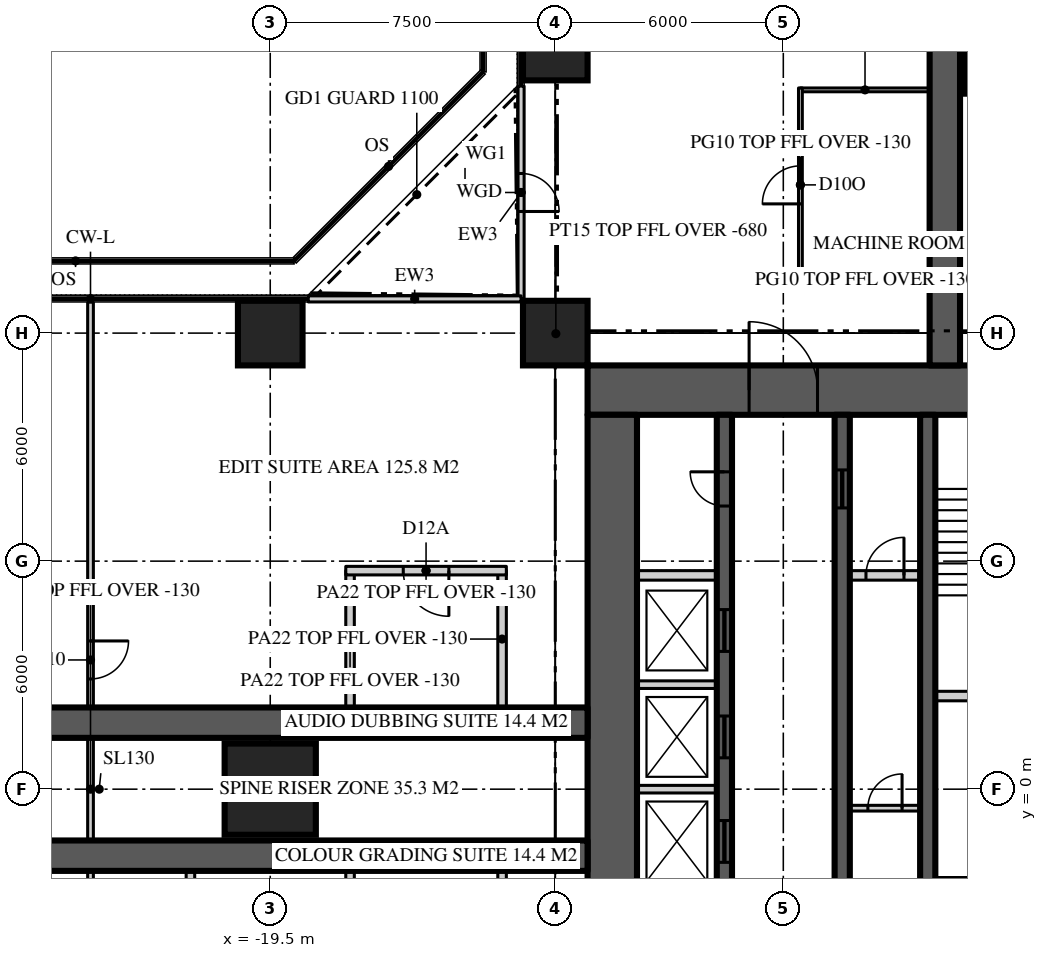
"""IFC4 building model, lengths in metres.
Left out: names, types, materials, properties, quantities, classifications, styles, units other than length and angle.
Written with IfcOpenShell. Run it as: python <this file> out.ifc"""

import sys

from ifc_helpers import new_model, si_unit, direction, frame, frame_2d, origin, origin_2d, place, context, subcontext, project, spatial, rectangle, extrude, element, fill, save


model = new_model("IFC4")
c1 = context("Model", 3, precision=1e-05, world=origin(), true_north=direction((0.0, 1.0)))
c2 = subcontext(c1, "Body", "Model", "MODEL_VIEW")
j1 = project(units=[si_unit("LENGTHUNIT", "METRE"), si_unit("PLANEANGLEUNIT", "RADIAN")], contexts=[c1])
p1 = place(None, origin())
s1 = spatial("IfcSite", under=j1, at=p1, CompositionType="ELEMENT")
p2 = place(p1, origin())
s2 = spatial("IfcBuilding", under=s1, at=p2, CompositionType="ELEMENT")
p3 = place(p2, frame((0.0, 0.0, 59.1)))
s3 = spatial("IfcBuildingStorey", under=s2, at=p3, CompositionType="ELEMENT", Elevation=59.1)
p4 = place(p3, frame((-11.15, 10.5, 0.0), z_axis=(0.0, 0.0, 1.0), x_axis=(1.0, 0.0, 0.0)))
e1 = element("IfcWall", 1, at=p4, inside=s3, PredefinedType="SHEAR", context=c2, shape_type="SweptSolid", body=[
    extrude(rectangle(XDim=22.3, YDim=1.3, at=frame_2d((11.15, 0.0))), origin(), (0.0, 0.0, 1.0), 3.9),
])
p5 = place(p4, frame((4.25, 0.0, 0.0)))
e2 = element("IfcOpeningElement", 2, at=p5, cuts=e1, PredefinedType="OPENING", context=c2, shape_type="SweptSolid", body=[
    extrude(rectangle(XDim=1.8, YDim=2.2, at=frame_2d((0.9, 1.1))), frame((0.0, 0.66, 0.0), z_axis=(0.0, -1.0, 0.0), x_axis=(1.0, 0.0, 0.0)), (0.0, 0.0, 1.0), 1.32),
])
p6 = place(p4, frame((16.25, 0.0, 0.0)))
e3 = element("IfcOpeningElement", 3, at=p6, cuts=e1, PredefinedType="OPENING", context=c2, shape_type="SweptSolid", body=[
    extrude(rectangle(XDim=1.8, YDim=2.2, at=frame_2d((0.9, 1.1))), frame((0.0, 0.66, 0.0), z_axis=(0.0, -1.0, 0.0), x_axis=(1.0, 0.0, 0.0)), (0.0, 0.0, 1.0), 1.32),
])
p7 = place(p3, frame((-10.5, 9.85, 0.0), z_axis=(0.0, 0.0, 1.0), x_axis=(0.0, -1.0, 0.0)))
e4 = element("IfcWall", 4, at=p7, inside=s3, PredefinedType="SHEAR", context=c2, shape_type="SweptSolid", body=[
    extrude(rectangle(XDim=19.7, YDim=1.3, at=frame_2d((9.85, 0.0))), origin(), (0.0, 0.0, 1.0), 3.9),
])
p8 = place(p7, frame((17.25, 0.0, 0.0)))
e5 = element("IfcOpeningElement", 5, at=p8, cuts=e4, PredefinedType="OPENING", context=c2, shape_type="SweptSolid", body=[
    extrude(rectangle(XDim=1.0, YDim=2.2, at=frame_2d((0.5, 1.1))), frame((0.0, 0.66, 0.0), z_axis=(0.0, -1.0, 0.0), x_axis=(1.0, 0.0, 0.0)), (0.0, 0.0, 1.0), 1.32),
])
for number, where, z_axis, x_axis in (
    (6, (-1.75, 11.15, 0.0), (0.0, 0.0, 1.0), (0.0, 1.0, 0.0)),
    (7, (-11.15, 1.75, 0.0), (0.0, 0.0, 1.0), (-1.0, 0.0, 0.0)),
    (8, (-11.15, -1.75, 0.0), (0.0, 0.0, 1.0), (-1.0, 0.0, 0.0)),
):
    element("IfcWall", number, at=place(p3, frame(where, z_axis=z_axis, x_axis=x_axis)), inside=s3, PredefinedType="SHEAR", context=c2, shape_type="SweptSolid", body=[
        extrude(rectangle(XDim=15.25, YDim=0.8, at=frame_2d((7.625, 0.0))), origin(), (0.0, 0.0, 1.0), 3.9),
    ])
p9 = place(p3, frame((-19.5, 0.0, 0.0), z_axis=(0.0, 0.0, 1.0), x_axis=(1.0, 0.0, 0.0)))
e9 = element("IfcColumn", 9, at=p9, inside=s3, PredefinedType="COLUMN", context=c2, shape_type="SweptSolid", body=[
    extrude(rectangle(XDim=2.4, YDim=2.4, at=origin_2d()), origin(), (0.0, 0.0, 1.0), 3.9),
])
for number, where, z_axis, x_axis in (
    (10, (-19.5, 12.0, 0.0), (0.0, 0.0, 1.0), (1.0, 0.0, 0.0)),
    (11, (-12.0, 12.0, 0.0), (0.0, 0.0, 1.0), (1.0, 0.0, 0.0)),
    (12, (-12.0, 19.5, 0.0), (0.0, 0.0, 1.0), (1.0, 0.0, 0.0)),
):
    element("IfcColumn", number, at=place(p3, frame(where, z_axis=z_axis, x_axis=x_axis)), inside=s3, PredefinedType="COLUMN", context=c2, shape_type="SweptSolid", body=[
        extrude(rectangle(XDim=1.7, YDim=1.7, at=origin_2d()), origin(), (0.0, 0.0, 1.0), 3.9),
    ])
p10 = place(p3, frame((0.0, 19.5, 0.0), z_axis=(0.0, 0.0, 1.0), x_axis=(1.0, 0.0, 0.0)))
e13 = element("IfcColumn", 13, at=p10, inside=s3, PredefinedType="COLUMN", context=c2, shape_type="SweptSolid", body=[
    extrude(rectangle(XDim=2.4, YDim=2.4, at=origin_2d()), origin(), (0.0, 0.0, 1.0), 3.9),
])
p11 = place(p3, frame((-12.9, 18.5, 0.0), z_axis=(0.0, 0.0, 1.0), x_axis=(0.0, -1.0, 0.0)))
e14 = element("IfcWall", 14, at=p11, inside=s3, PredefinedType="SOLIDWALL", context=c2, shape_type="SweptSolid", body=[
    extrude(rectangle(XDim=5.6, YDim=0.16, at=frame_2d((2.8, 0.0))), origin(), (0.0, 0.0, 1.0), 3.77),
])
p12 = place(p11, frame((2.3, 0.0, 0.0)))
e15 = element("IfcOpeningElement", 15, at=p12, cuts=e14, PredefinedType="OPENING", context=c2, shape_type="SweptSolid", body=[
    extrude(rectangle(XDim=1.0, YDim=2.2, at=frame_2d((0.5, 1.1))), frame((0.0, 0.09, 0.0), z_axis=(0.0, -1.0, 0.0), x_axis=(1.0, 0.0, 0.0)), (0.0, 0.0, 1.0), 0.18),
])
p13 = place(p3, frame((-12.9, 12.9, 0.0), z_axis=(0.0, 0.0, 1.0), x_axis=(-1.0, 0.0, 0.0)))
e16 = element("IfcWall", 16, at=p13, inside=s3, PredefinedType="SOLIDWALL", context=c2, shape_type="SweptSolid", body=[
    extrude(rectangle(XDim=5.6, YDim=0.16, at=frame_2d((2.8, 0.0))), origin(), (0.0, 0.0, 1.0), 3.77),
])
p14 = place(p3, frame((-7.55, -9.85, 0.0), z_axis=(0.0, 0.0, 1.0), x_axis=(0.0, 1.0, 0.0)))
e17 = element("IfcWall", 17, at=p14, inside=s3, PredefinedType="SHEAR", context=c2, shape_type="SweptSolid", body=[
    extrude(rectangle(XDim=19.7, YDim=0.4, at=frame_2d((9.85, 0.0))), origin(), (0.0, 0.0, 1.0), 3.9),
])
p15 = place(p14, frame((1.45, 0.0, 0.0)))
e18 = element("IfcOpeningElement", 18, at=p15, cuts=e17, PredefinedType="OPENING", context=c2, shape_type="SweptSolid", body=[
    extrude(rectangle(XDim=1.0, YDim=2.2, at=frame_2d((0.5, 1.1))), frame((0.0, 0.21, 0.0), z_axis=(0.0, -1.0, 0.0), x_axis=(1.0, 0.0, 0.0)), (0.0, 0.0, 1.0), 0.42),
])
p16 = place(p14, frame((17.3, 0.0, 0.0)))
e19 = element("IfcOpeningElement", 19, at=p16, cuts=e17, PredefinedType="OPENING", context=c2, shape_type="SweptSolid", body=[
    extrude(rectangle(XDim=0.9, YDim=2.1, at=frame_2d((0.45, 1.05))), frame((0.0, 0.21, 0.0), z_axis=(0.0, -1.0, 0.0), x_axis=(1.0, 0.0, 0.0)), (0.0, 0.0, 1.0), 0.42),
])
p17 = place(p14, frame((5.125, 0.0, 0.0)))
e20 = element("IfcOpeningElement", 20, at=p17, cuts=e17, PredefinedType="OPENING", context=c2, shape_type="SweptSolid", body=[
    extrude(rectangle(XDim=1.1, YDim=2.2, at=frame_2d((0.55, 1.1))), frame((0.0, 0.21, 0.0), z_axis=(0.0, -1.0, 0.0), x_axis=(1.0, 0.0, 0.0)), (0.0, 0.0, 1.0), 0.42),
])
p18 = place(p14, frame((7.925, 0.0, 0.0)))
e21 = element("IfcOpeningElement", 21, at=p18, cuts=e17, PredefinedType="OPENING", context=c2, shape_type="SweptSolid", body=[
    extrude(rectangle(XDim=1.1, YDim=2.2, at=frame_2d((0.55, 1.1))), frame((0.0, 0.21, 0.0), z_axis=(0.0, -1.0, 0.0), x_axis=(1.0, 0.0, 0.0)), (0.0, 0.0, 1.0), 0.42),
])
p19 = place(p14, frame((10.675, 0.0, 0.0)))
e22 = element("IfcOpeningElement", 22, at=p19, cuts=e17, PredefinedType="OPENING", context=c2, shape_type="SweptSolid", body=[
    extrude(rectangle(XDim=1.1, YDim=2.2, at=frame_2d((0.55, 1.1))), frame((0.0, 0.21, 0.0), z_axis=(0.0, -1.0, 0.0), x_axis=(1.0, 0.0, 0.0)), (0.0, 0.0, 1.0), 0.42),
])
p20 = place(p14, frame((13.475, 0.0, 0.0)))
e23 = element("IfcOpeningElement", 23, at=p20, cuts=e17, PredefinedType="OPENING", context=c2, shape_type="SweptSolid", body=[
    extrude(rectangle(XDim=1.1, YDim=2.2, at=frame_2d((0.55, 1.1))), frame((0.0, 0.21, 0.0), z_axis=(0.0, -1.0, 0.0), x_axis=(1.0, 0.0, 0.0)), (0.0, 0.0, 1.0), 0.42),
])
p21 = place(p3, frame((-4.45, -9.85, 0.0), z_axis=(0.0, 0.0, 1.0), x_axis=(0.0, 1.0, 0.0)))
e24 = element("IfcWall", 24, at=p21, inside=s3, PredefinedType="SHEAR", context=c2, shape_type="SweptSolid", body=[
    extrude(rectangle(XDim=19.7, YDim=0.4, at=frame_2d((9.85, 0.0))), origin(), (0.0, 0.0, 1.0), 3.9),
])
p22 = place(p21, frame((1.95, 0.0, 0.0)))
e25 = element("IfcOpeningElement", 25, at=p22, cuts=e24, PredefinedType="OPENING", context=c2, shape_type="SweptSolid", body=[
    extrude(rectangle(XDim=1.0, YDim=2.2, at=frame_2d((0.5, 1.1))), frame((0.0, 0.21, 0.0), z_axis=(0.0, -1.0, 0.0), x_axis=(1.0, 0.0, 0.0)), (0.0, 0.0, 1.0), 0.42),
])
p23 = place(p21, frame((17.25, 0.0, 0.0)))
e26 = element("IfcOpeningElement", 26, at=p23, cuts=e24, PredefinedType="OPENING", context=c2, shape_type="SweptSolid", body=[
    extrude(rectangle(XDim=1.0, YDim=2.1, at=frame_2d((0.5, 1.05))), frame((0.0, 0.21, 0.0), z_axis=(0.0, -1.0, 0.0), x_axis=(1.0, 0.0, 0.0)), (0.0, 0.0, 1.0), 0.42),
])
p24 = place(p3, frame((-2.2, -9.85, 0.0), z_axis=(0.0, 0.0, 1.0), x_axis=(0.0, 1.0, 0.0)))
e27 = element("IfcWall", 27, at=p24, inside=s3, PredefinedType="SHEAR", context=c2, shape_type="SweptSolid", body=[
    extrude(rectangle(XDim=19.7, YDim=0.4, at=frame_2d((9.85, 0.0))), origin(), (0.0, 0.0, 1.0), 3.9),
])
p25 = place(p24, frame((0.35, 0.0, 0.0)))
e28 = element("IfcOpeningElement", 28, at=p25, cuts=e27, PredefinedType="OPENING", context=c2, shape_type="SweptSolid", body=[
    extrude(rectangle(XDim=1.0, YDim=2.2, at=frame_2d((0.5, 1.1))), frame((0.0, 0.21, 0.0), z_axis=(0.0, -1.0, 0.0), x_axis=(1.0, 0.0, 0.0)), (0.0, 0.0, 1.0), 0.42),
])
p26 = place(p3, frame((-9.85, 5.625, 0.0), z_axis=(0.0, 0.0, 1.0), x_axis=(1.0, 0.0, 0.0)))
e29 = element("IfcWall", 29, at=p26, inside=s3, PredefinedType="SOLIDWALL", context=c2, shape_type="SweptSolid", body=[
    extrude(rectangle(XDim=2.1, YDim=0.25, at=frame_2d((1.05, 0.0))), origin(), (0.0, 0.0, 1.0), 3.7),
])
p27 = place(p3, frame((-4.25, 5.625, 0.0), z_axis=(0.0, 0.0, 1.0), x_axis=(1.0, 0.0, 0.0)))
e30 = element("IfcWall", 30, at=p27, inside=s3, PredefinedType="SOLIDWALL", context=c2, shape_type="SweptSolid", body=[
    extrude(rectangle(XDim=1.85, YDim=0.25, at=frame_2d((0.925, 0.0))), origin(), (0.0, 0.0, 1.0), 3.7),
])
p28 = place(p27, frame((0.425, 0.0, 0.0)))
e31 = element("IfcOpeningElement", 31, at=p28, cuts=e30, PredefinedType="OPENING", context=c2, shape_type="SweptSolid", body=[
    extrude(rectangle(XDim=1.0, YDim=2.2, at=frame_2d((0.5, 1.1))), frame((0.0, 0.135, 0.0), z_axis=(0.0, -1.0, 0.0), x_axis=(1.0, 0.0, 0.0)), (0.0, 0.0, 1.0), 0.27),
])
for number, where, z_axis, x_axis in (
    (32, (-2.0, -2.45, 0.0), (0.0, 0.0, 1.0), (1.0, 0.0, 0.0)),
    (33, (-2.0, 2.45, 0.0), (0.0, 0.0, 1.0), (1.0, 0.0, 0.0)),
):
    element("IfcWall", number, at=place(p3, frame(where, z_axis=z_axis, x_axis=x_axis)), inside=s3, PredefinedType="SOLIDWALL", context=c2, shape_type="SweptSolid", body=[
        extrude(rectangle(XDim=4.0, YDim=0.25, at=frame_2d((2.0, 0.0))), origin(), (0.0, 0.0, 1.0), 3.7),
    ])
for number, where, z_axis, x_axis in (
    (34, (-9.85, 0.0, 0.0), (0.0, 0.0, 1.0), (1.0, 0.0, 0.0)),
    (35, (-9.85, 2.75, 0.0), (0.0, 0.0, 1.0), (1.0, 0.0, 0.0)),
):
    element("IfcWall", number, at=place(p3, frame(where, z_axis=z_axis, x_axis=x_axis)), inside=s3, PredefinedType="SOLIDWALL", context=c2, shape_type="SweptSolid", body=[
        extrude(rectangle(XDim=2.1, YDim=0.2, at=frame_2d((1.05, 0.0))), origin(), (0.0, 0.0, 1.0), 3.7),
    ])
for number, where, z_axis, x_axis in (
    (36, (-2.15, 13.4, 0.0), (0.0, 0.0, 1.0), (-1.0, 0.0, 0.0)),
    (37, (-2.15, 18.4, 0.0), (0.0, 0.0, 1.0), (-1.0, 0.0, 0.0)),
):
    element("IfcWall", number, at=place(p3, frame(where, z_axis=z_axis, x_axis=x_axis)), inside=s3, PredefinedType="PARTITIONING", context=c2, shape_type="SweptSolid", body=[
        extrude(rectangle(XDim=3.4, YDim=0.1, at=frame_2d((1.7, 0.0))), origin(), (0.0, 0.0, 1.0), 3.77),
    ])
p29 = place(p3, frame((-5.55, 13.35, 0.0), z_axis=(0.0, 0.0, 1.0), x_axis=(0.0, 1.0, 0.0)))
e38 = element("IfcWall", 38, at=p29, inside=s3, PredefinedType="PARTITIONING", context=c2, shape_type="SweptSolid", body=[
    extrude(rectangle(XDim=5.1, YDim=0.1, at=frame_2d((2.55, 0.0))), origin(), (0.0, 0.0, 1.0), 3.77),
])
p30 = place(p29, frame((2.05, 0.0, 0.0)))
e39 = element("IfcOpeningElement", 39, at=p30, cuts=e38, PredefinedType="OPENING", context=c2, shape_type="SweptSolid", body=[
    extrude(rectangle(XDim=1.0, YDim=2.2, at=frame_2d((0.5, 1.1))), frame((0.0, 0.06, 0.0), z_axis=(0.0, -1.0, 0.0), x_axis=(1.0, 0.0, 0.0)), (0.0, 0.0, 1.0), 0.12),
])
p31 = place(p3, frame((-24.229, 12.82, 0.0), z_axis=(0.0, 0.0, 1.0), x_axis=(0.0, -1.0, 0.0)))
e40 = element("IfcWall", 40, at=p31, inside=s3, PredefinedType="PARTITIONING", context=c2, shape_type="SweptSolid", body=[
    extrude(rectangle(XDim=25.64, YDim=0.15, at=frame_2d((12.82, 0.0))), origin(), (0.0, 0.0, 1.0), 3.77),
])
p32 = place(p31, frame((15.72, 0.0, 0.0)))
e41 = element("IfcOpeningElement", 41, at=p32, cuts=e40, PredefinedType="OPENING", context=c2, shape_type="SweptSolid", body=[
    extrude(rectangle(XDim=1.0, YDim=2.2, at=frame_2d((0.5, 1.1))), frame((0.0, 0.085, 0.0), z_axis=(0.0, -1.0, 0.0), x_axis=(1.0, 0.0, 0.0)), (0.0, 0.0, 1.0), 0.17),
])
p33 = place(p31, frame((8.92, 0.0, 0.0)))
e42 = element("IfcOpeningElement", 42, at=p33, cuts=e40, PredefinedType="OPENING", context=c2, shape_type="SweptSolid", body=[
    extrude(rectangle(XDim=1.0, YDim=2.2, at=frame_2d((0.5, 1.1))), frame((0.0, 0.085, 0.0), z_axis=(0.0, -1.0, 0.0), x_axis=(1.0, 0.0, 0.0)), (0.0, 0.0, 1.0), 0.17),
])
for number, where, z_axis, x_axis in (
    (43, (-13.4, -2.15, 0.0), (0.0, 0.0, 1.0), (0.0, -1.0, 0.0)),
    (44, (-17.4, -2.15, 0.0), (0.0, 0.0, 1.0), (0.0, -1.0, 0.0)),
    (45, (-21.6, -2.15, 0.0), (0.0, 0.0, 1.0), (0.0, -1.0, 0.0)),
    (46, (-13.4, 2.15, 0.0), (0.0, 0.0, 1.0), (0.0, 1.0, 0.0)),
    (47, (-17.4, 2.15, 0.0), (0.0, 0.0, 1.0), (0.0, 1.0, 0.0)),
):
    element("IfcWall", number, at=place(p3, frame(where, z_axis=z_axis, x_axis=x_axis)), inside=s3, PredefinedType="PARTITIONING", context=c2, shape_type="SweptSolid", body=[
        extrude(rectangle(XDim=3.6, YDim=0.225, at=frame_2d((1.8, 0.0))), origin(), (0.0, 0.0, 1.0), 3.77),
    ])
p34 = place(p3, frame((-13.288, 5.75, 0.0), z_axis=(0.0, 0.0, 1.0), x_axis=(-1.0, 0.0, 0.0)))
e48 = element("IfcWall", 48, at=p34, inside=s3, PredefinedType="PARTITIONING", context=c2, shape_type="SweptSolid", body=[
    extrude(rectangle(XDim=4.225, YDim=0.225, at=frame_2d((2.112, 0.0))), origin(), (0.0, 0.0, 1.0), 3.77),
])
p35 = place(p34, frame((1.512, 0.0, 0.0)))
e49 = element("IfcOpeningElement", 49, at=p35, cuts=e48, PredefinedType="OPENING", context=c2, shape_type="SweptSolid", body=[
    extrude(rectangle(XDim=1.2, YDim=2.2, at=frame_2d((0.6, 1.1))), frame((0.0, 0.123, 0.0), z_axis=(0.0, -1.0, 0.0), x_axis=(1.0, 0.0, 0.0)), (0.0, 0.0, 1.0), 0.245),
])
p36 = place(p3, frame((-11.15, 11.15, 0.0), z_axis=(0.0, 0.0, 1.0), x_axis=(-0.707106781187, 0.707106781187, 0.0)))
e50 = element("IfcWall", 50, at=p36, inside=s3, PredefinedType="PARTITIONING", context=c2, shape_type="SweptSolid", body=[
    extrude(rectangle(XDim=2.362, YDim=0.15, at=frame_2d((1.181, 0.0))), origin(), (0.0, 0.0, 1.0), 3.22),
])
p37 = place(p3, frame((-4.25, -0.5, 0.0), z_axis=(0.0, 0.0, 1.0), x_axis=(1.0, 0.0, 0.0)))
e51 = element("IfcWall", 51, at=p37, inside=s3, PredefinedType="SOLIDWALL", context=c2, shape_type="SweptSolid", body=[
    extrude(rectangle(XDim=1.85, YDim=0.15, at=frame_2d((0.925, 0.0))), origin(), (0.0, 0.0, 1.0), 3.77),
])
p38 = place(p37, frame((0.475, 0.0, 0.0)))
e52 = element("IfcOpeningElement", 52, at=p38, cuts=e51, PredefinedType="OPENING", context=c2, shape_type="SweptSolid", body=[
    extrude(rectangle(XDim=0.9, YDim=2.1, at=frame_2d((0.45, 1.05))), frame((0.0, 0.085, 0.0), z_axis=(0.0, -1.0, 0.0), x_axis=(1.0, 0.0, 0.0)), (0.0, 0.0, 1.0), 0.17),
])
p39 = place(p12, origin())
e53 = element("IfcDoor", 53, at=p39, inside=s3, OperationType="SINGLE_SWING_RIGHT", PredefinedType="DOOR", context=c2, shape_type="SweptSolid", body=[
    extrude(rectangle(XDim=1.0, YDim=2.2, at=frame_2d((0.5, 1.1))), frame((0.0, 0.025, 0.0), z_axis=(0.0, -1.0, 0.0), x_axis=(1.0, 0.0, 0.0)), (0.0, 0.0, 1.0), 0.05),
])
fill(e15, e53)
p40 = place(p5, origin())
e54 = element("IfcDoor", 54, at=p40, inside=s3, OperationType="DOUBLE_DOOR_DOUBLE_SWING", PredefinedType="DOOR", context=c2, shape_type="SweptSolid", body=[
    extrude(rectangle(XDim=1.8, YDim=2.2, at=frame_2d((0.9, 1.1))), frame((0.0, 0.025, 0.0), z_axis=(0.0, -1.0, 0.0), x_axis=(1.0, 0.0, 0.0)), (0.0, 0.0, 1.0), 0.05),
])
fill(e2, e54)
p41 = place(p16, origin())
e55 = element("IfcDoor", 55, at=p41, inside=s3, OperationType="SINGLE_SWING_RIGHT", PredefinedType="DOOR", context=c2, shape_type="SweptSolid", body=[
    extrude(rectangle(XDim=0.9, YDim=2.1, at=frame_2d((0.45, 1.05))), frame((0.0, 0.025, 0.0), z_axis=(0.0, -1.0, 0.0), x_axis=(1.0, 0.0, 0.0)), (0.0, 0.0, 1.0), 0.05),
])
fill(e19, e55)
p42 = place(p23, origin())
e56 = element("IfcDoor", 56, at=p42, inside=s3, OperationType="SLIDING_TO_LEFT", PredefinedType="DOOR", context=c2, shape_type="SweptSolid", body=[
    extrude(rectangle(XDim=1.0, YDim=2.1, at=frame_2d((0.5, 1.05))), frame((0.0, 0.025, 0.0), z_axis=(0.0, -1.0, 0.0), x_axis=(1.0, 0.0, 0.0)), (0.0, 0.0, 1.0), 0.05),
])
fill(e26, e56)
p43 = place(p18, origin())
e57 = element("IfcDoor", 57, at=p43, inside=s3, OperationType="SLIDING_TO_LEFT", PredefinedType="DOOR", context=c2, shape_type="SweptSolid", body=[
    extrude(rectangle(XDim=1.1, YDim=2.2, at=frame_2d((0.55, 1.1))), frame((0.0, 0.025, 0.0), z_axis=(0.0, -1.0, 0.0), x_axis=(1.0, 0.0, 0.0)), (0.0, 0.0, 1.0), 0.05),
])
fill(e21, e57)
p44 = place(p19, origin())
e58 = element("IfcDoor", 58, at=p44, inside=s3, OperationType="SLIDING_TO_LEFT", PredefinedType="DOOR", context=c2, shape_type="SweptSolid", body=[
    extrude(rectangle(XDim=1.1, YDim=2.2, at=frame_2d((0.55, 1.1))), frame((0.0, 0.025, 0.0), z_axis=(0.0, -1.0, 0.0), x_axis=(1.0, 0.0, 0.0)), (0.0, 0.0, 1.0), 0.05),
])
fill(e22, e58)
p45 = place(p20, origin())
e59 = element("IfcDoor", 59, at=p45, inside=s3, OperationType="SLIDING_TO_LEFT", PredefinedType="DOOR", context=c2, shape_type="SweptSolid", body=[
    extrude(rectangle(XDim=1.1, YDim=2.2, at=frame_2d((0.55, 1.1))), frame((0.0, 0.025, 0.0), z_axis=(0.0, -1.0, 0.0), x_axis=(1.0, 0.0, 0.0)), (0.0, 0.0, 1.0), 0.05),
])
fill(e23, e59)
p46 = place(p30, origin())
e60 = element("IfcDoor", 60, at=p46, inside=s3, OperationType="SINGLE_SWING_LEFT", PredefinedType="DOOR", context=c2, shape_type="SweptSolid", body=[
    extrude(rectangle(XDim=1.0, YDim=2.2, at=frame_2d((0.5, 1.1))), frame((0.0, 0.025, 0.0), z_axis=(0.0, -1.0, 0.0), x_axis=(1.0, 0.0, 0.0)), (0.0, 0.0, 1.0), 0.05),
])
fill(e39, e60)
p47 = place(p33, origin())
e61 = element("IfcDoor", 61, at=p47, inside=s3, OperationType="SINGLE_SWING_LEFT", PredefinedType="DOOR", context=c2, shape_type="SweptSolid", body=[
    extrude(rectangle(XDim=1.0, YDim=2.2, at=frame_2d((0.5, 1.1))), frame((0.0, 0.025, 0.0), z_axis=(0.0, -1.0, 0.0), x_axis=(1.0, 0.0, 0.0)), (0.0, 0.0, 1.0), 0.05),
])
fill(e42, e61)
p48 = place(p35, origin())
e62 = element("IfcDoor", 62, at=p48, inside=s3, OperationType="SINGLE_SWING_LEFT", PredefinedType="DOOR", context=c2, shape_type="SweptSolid", body=[
    extrude(rectangle(XDim=1.2, YDim=2.2, at=frame_2d((0.6, 1.1))), frame((0.0, 0.025, 0.0), z_axis=(0.0, -1.0, 0.0), x_axis=(1.0, 0.0, 0.0)), (0.0, 0.0, 1.0), 0.05),
])
fill(e49, e62)
p49 = place(p38, origin())
e63 = element("IfcDoor", 63, at=p49, inside=s3, OperationType="SINGLE_SWING_RIGHT", PredefinedType="DOOR", context=c2, shape_type="SweptSolid", body=[
    extrude(rectangle(XDim=0.9, YDim=2.1, at=frame_2d((0.45, 1.05))), frame((0.0, 0.025, 0.0), z_axis=(0.0, -1.0, 0.0), x_axis=(1.0, 0.0, 0.0)), (0.0, 0.0, 1.0), 0.05),
])
fill(e52, e63)
p50 = place(p28, origin())
e64 = element("IfcDoor", 64, at=p50, inside=s3, OperationType="SINGLE_SWING_RIGHT", PredefinedType="DOOR", context=c2, shape_type="SweptSolid", body=[
    extrude(rectangle(XDim=1.0, YDim=2.2, at=frame_2d((0.5, 1.1))), frame((0.0, 0.025, 0.0), z_axis=(0.0, -1.0, 0.0), x_axis=(1.0, 0.0, 0.0)), (0.0, 0.0, 1.0), 0.05),
])
fill(e31, e64)
save(model, sys.argv[1])
